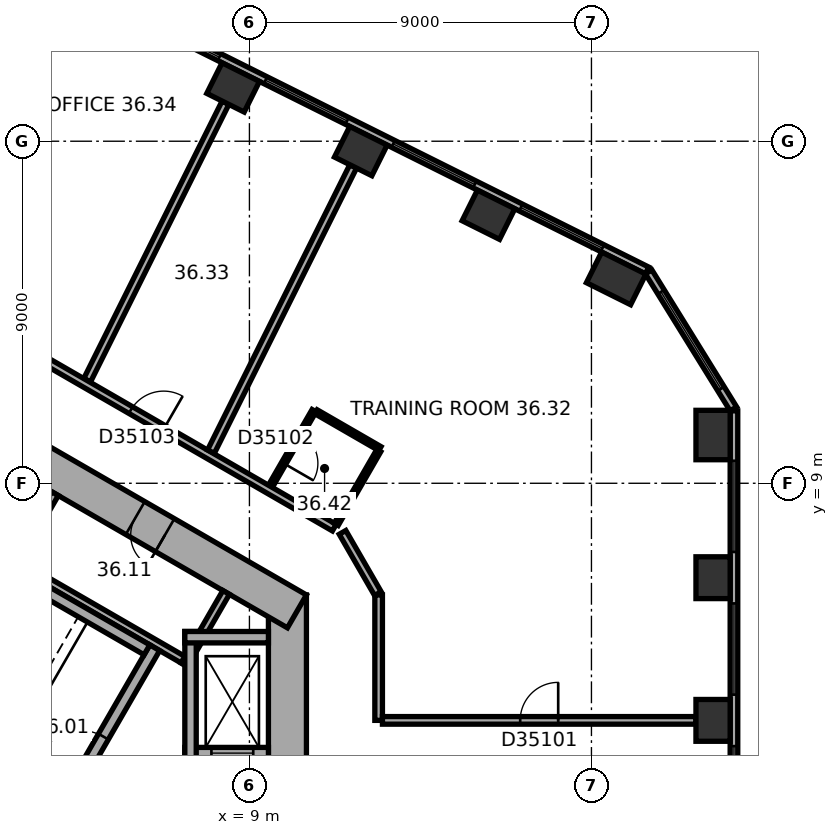
"""IFC4 building model, lengths in metres.
Left out: names, types, materials, properties, quantities, classifications, styles, units other than length and angle.
Written with IfcOpenShell. Run it as: python <this file> out.ifc"""

import sys

from ifc_helpers import new_model, si_unit, direction, frame, frame_2d, origin, origin_2d, place, context, subcontext, project, spatial, rectangle, extrude, element, fill, save


model = new_model("IFC4")
c1 = context("Model", 3, precision=1e-05, world=origin(), true_north=direction((0.0, 1.0)))
c2 = subcontext(c1, "Body", "Model", "MODEL_VIEW")
j1 = project(units=[si_unit("LENGTHUNIT", "METRE"), si_unit("PLANEANGLEUNIT", "RADIAN")], contexts=[c1])
p1 = place(None, origin())
s1 = spatial("IfcSite", under=j1, at=p1, CompositionType="ELEMENT")
p2 = place(p1, origin())
s2 = spatial("IfcBuilding", under=s1, at=p2, CompositionType="ELEMENT")
p3 = place(p2, frame((0.0, 0.0, 150.3)))
s3 = spatial("IfcBuildingStorey", under=s2, at=p3, CompositionType="ELEMENT", Elevation=150.3)
for number, where, z_axis, x_axis in (
    (1, (21.2, 2.761, 0.0), (0.0, 0.0, 1.0), (0.0, 1.0, 0.0)),
    (2, (21.2, 6.515, 0.0), (0.0, 0.0, 1.0), (0.0, 1.0, 0.0)),
):
    element("IfcColumn", number, at=place(p3, frame(where, z_axis=z_axis, x_axis=x_axis)), inside=s3, PredefinedType="COLUMN", context=c2, shape_type="SweptSolid", body=[
        extrude(rectangle(XDim=1.1, YDim=0.9, at=origin_2d()), origin(), (0.0, 0.0, 1.0), 3.7),
    ])
for number, where, z_axis, x_axis in (
    (3, (21.2, 10.27, 0.0), (0.0, 0.0, 1.0), (0.0, 1.0, 0.0)),
    (4, (18.65, 14.39, 0.0), (0.0, 0.0, 1.0), (-0.895, 0.446, 0.0)),
):
    element("IfcColumn", number, at=place(p3, frame(where, z_axis=z_axis, x_axis=x_axis)), inside=s3, PredefinedType="COLUMN", context=c2, shape_type="SweptSolid", body=[
        extrude(rectangle(XDim=1.3, YDim=0.9, at=origin_2d()), origin(), (0.0, 0.0, 1.0), 3.7),
    ])
for number, where, z_axis, x_axis in (
    (5, (15.29, 16.065, 0.0), (0.0, 0.0, 1.0), (-0.895, 0.446, 0.0)),
    (6, (11.931, 17.74, 0.0), (0.0, 0.0, 1.0), (-0.895, 0.446, 0.0)),
    (7, (8.571, 19.416, 0.0), (0.0, 0.0, 1.0), (-0.895, 0.446, 0.0)),
):
    element("IfcColumn", number, at=place(p3, frame(where, z_axis=z_axis, x_axis=x_axis)), inside=s3, PredefinedType="COLUMN", context=c2, shape_type="SweptSolid", body=[
        extrude(rectangle(XDim=1.1, YDim=0.9, at=origin_2d()), origin(), (0.0, 0.0, 1.0), 3.7),
    ])
p4 = place(p3, frame((10.0, -6.062, 0.0), z_axis=(0.0, 0.0, 1.0), x_axis=(0.0, 1.0, 0.0)))
e8 = element("IfcWall", 8, at=p4, inside=s3, PredefinedType="SHEAR", context=c2, shape_type="SweptSolid", body=[
    extrude(rectangle(XDim=12.125, YDim=1.0, at=frame_2d((6.062, 0.0))), origin(), (0.0, 0.0, 1.0), 3.7),
])
p5 = place(p4, frame((6.262, 0.0, 0.0)))
e9 = element("IfcOpeningElement", 9, at=p5, cuts=e8, PredefinedType="OPENING", context=c2, shape_type="SweptSolid", body=[
    extrude(rectangle(XDim=1.5, YDim=2.1, at=frame_2d((0.75, 1.05))), frame((0.0, 0.51, 0.0), z_axis=(0.0, -1.0, 0.0), x_axis=(1.0, 0.0, 0.0)), (0.0, 0.0, 1.0), 1.02),
])
p6 = place(p4, frame((3.112, 0.0, 0.0)))
e10 = element("IfcOpeningElement", 10, at=p6, cuts=e8, PredefinedType="OPENING", context=c2, shape_type="SweptSolid", body=[
    extrude(rectangle(XDim=0.9, YDim=2.1, at=frame_2d((0.45, 1.05))), frame((0.0, 0.51, 0.0), z_axis=(0.0, -1.0, 0.0), x_axis=(1.0, 0.0, 0.0)), (0.0, 0.0, 1.0), 1.02),
])
p7 = place(p3, frame((10.25, 5.629, 0.0), z_axis=(0.0, 0.0, 1.0), x_axis=(-0.866022616891, 0.50000482701, 0.0)))
e11 = element("IfcWall", 11, at=p7, inside=s3, PredefinedType="SHEAR", context=c2, shape_type="SweptSolid", body=[
    extrude(rectangle(XDim=12.125, YDim=1.0, at=frame_2d((6.062, 0.0))), origin(), (0.0, 0.0, 1.0), 3.7),
])
p8 = place(p7, frame((4.012, 0.0, 0.0)))
e12 = element("IfcOpeningElement", 12, at=p8, cuts=e11, PredefinedType="OPENING", context=c2, shape_type="SweptSolid", body=[
    extrude(rectangle(XDim=0.9, YDim=2.1, at=frame_2d((0.45, 1.05))), frame((0.0, 0.51, 0.0), z_axis=(0.0, -1.0, 0.0), x_axis=(1.0, 0.0, 0.0)), (0.0, 0.0, 1.0), 1.02),
])
p9 = place(p7, frame((7.912, 0.0, 0.0)))
e13 = element("IfcOpeningElement", 13, at=p9, cuts=e11, PredefinedType="OPENING", context=c2, shape_type="SweptSolid", body=[
    extrude(rectangle(XDim=0.9, YDim=2.1, at=frame_2d((0.45, 1.05))), frame((0.0, 0.51, 0.0), z_axis=(0.0, -1.0, 0.0), x_axis=(1.0, 0.0, 0.0)), (0.0, 0.0, 1.0), 1.02),
])
p10 = place(p3, frame((21.75, -9.138, 0.0), z_axis=(0.0, 0.0, 1.0), x_axis=(0.0, 1.0, 0.0)))
e14 = element("IfcWall", 14, at=p10, inside=s3, PredefinedType="STANDARD", context=c2, shape_type="SweptSolid", body=[
    extrude(rectangle(XDim=20.044, YDim=0.2, at=frame_2d((10.022, 0.0))), origin(), (0.0, 0.0, 1.0), 3.7),
])
p11 = place(p10, frame((1.314, 0.0, 0.9)))
e15 = element("IfcOpeningElement", 15, at=p11, cuts=e14, PredefinedType="OPENING", context=c2, shape_type="SweptSolid", body=[
    extrude(rectangle(XDim=2.4, YDim=2.0, at=frame_2d((1.2, 1.0))), frame((0.0, 0.11, 0.0), z_axis=(0.0, -1.0, 0.0), x_axis=(1.0, 0.0, 0.0)), (0.0, 0.0, 1.0), 0.22),
])
p12 = place(p10, frame((5.069, 0.0, 0.9)))
e16 = element("IfcOpeningElement", 16, at=p12, cuts=e14, PredefinedType="OPENING", context=c2, shape_type="SweptSolid", body=[
    extrude(rectangle(XDim=2.4, YDim=2.0, at=frame_2d((1.2, 1.0))), frame((0.0, 0.11, 0.0), z_axis=(0.0, -1.0, 0.0), x_axis=(1.0, 0.0, 0.0)), (0.0, 0.0, 1.0), 0.22),
])
p13 = place(p10, frame((8.823, 0.0, 0.9)))
e17 = element("IfcOpeningElement", 17, at=p13, cuts=e14, PredefinedType="OPENING", context=c2, shape_type="SweptSolid", body=[
    extrude(rectangle(XDim=2.4, YDim=2.0, at=frame_2d((1.2, 1.0))), frame((0.0, 0.11, 0.0), z_axis=(0.0, -1.0, 0.0), x_axis=(1.0, 0.0, 0.0)), (0.0, 0.0, 1.0), 0.22),
])
p14 = place(p10, frame((12.577, 0.0, 0.9)))
e18 = element("IfcOpeningElement", 18, at=p14, cuts=e14, PredefinedType="OPENING", context=c2, shape_type="SweptSolid", body=[
    extrude(rectangle(XDim=2.4, YDim=2.0, at=frame_2d((1.2, 1.0))), frame((0.0, 0.11, 0.0), z_axis=(0.0, -1.0, 0.0), x_axis=(1.0, 0.0, 0.0)), (0.0, 0.0, 1.0), 0.22),
])
p15 = place(p10, frame((16.331, 0.0, 0.9)))
e19 = element("IfcOpeningElement", 19, at=p15, cuts=e14, PredefinedType="OPENING", context=c2, shape_type="SweptSolid", body=[
    extrude(rectangle(XDim=2.4, YDim=2.0, at=frame_2d((1.2, 1.0))), frame((0.0, 0.11, 0.0), z_axis=(0.0, -1.0, 0.0), x_axis=(1.0, 0.0, 0.0)), (0.0, 0.0, 1.0), 0.22),
])
p16 = place(p3, frame((21.735, 10.958, 0.0), z_axis=(0.0, 0.0, 1.0), x_axis=(-0.526213807775, 0.850352296702, 0.0)))
e20 = element("IfcWall", 20, at=p16, inside=s3, PredefinedType="STANDARD", context=c2, shape_type="SweptSolid", body=[
    extrude(rectangle(XDim=4.238, YDim=0.2, at=frame_2d((2.119, 0.0))), origin(), (0.0, 0.0, 1.0), 3.7),
])
p17 = place(p16, frame((0.619, 0.0, 0.9)))
e21 = element("IfcOpeningElement", 21, at=p17, cuts=e20, PredefinedType="OPENING", context=c2, shape_type="SweptSolid", body=[
    extrude(rectangle(XDim=3.0, YDim=2.0, at=frame_2d((1.5, 1.0))), frame((0.0, 0.11, 0.0), z_axis=(0.0, -1.0, 0.0), x_axis=(1.0, 0.0, 0.0)), (0.0, 0.0, 1.0), 0.22),
])
p18 = place(p3, frame((19.464, 14.599, 0.0), z_axis=(0.0, 0.0, 1.0), x_axis=(-0.894935755043, 0.446195018289, 0.0)))
e22 = element("IfcWall", 22, at=p18, inside=s3, PredefinedType="STANDARD", context=c2, shape_type="SweptSolid", body=[
    extrude(rectangle(XDim=20.044, YDim=0.2, at=frame_2d((10.022, 0.0))), origin(), (0.0, 0.0, 1.0), 3.7),
])
p19 = place(p18, frame((1.313, 0.0, 0.9)))
e23 = element("IfcOpeningElement", 23, at=p19, cuts=e22, PredefinedType="OPENING", context=c2, shape_type="SweptSolid", body=[
    extrude(rectangle(XDim=2.4, YDim=2.0, at=frame_2d((1.2, 1.0))), frame((0.0, 0.11, 0.0), z_axis=(0.0, -1.0, 0.0), x_axis=(1.0, 0.0, 0.0)), (0.0, 0.0, 1.0), 0.22),
])
p20 = place(p18, frame((5.067, 0.0, 0.9)))
e24 = element("IfcOpeningElement", 24, at=p20, cuts=e22, PredefinedType="OPENING", context=c2, shape_type="SweptSolid", body=[
    extrude(rectangle(XDim=2.4, YDim=2.0, at=frame_2d((1.2, 1.0))), frame((0.0, 0.11, 0.0), z_axis=(0.0, -1.0, 0.0), x_axis=(1.0, 0.0, 0.0)), (0.0, 0.0, 1.0), 0.22),
])
p21 = place(p18, frame((8.821, 0.0, 0.9)))
e25 = element("IfcOpeningElement", 25, at=p21, cuts=e22, PredefinedType="OPENING", context=c2, shape_type="SweptSolid", body=[
    extrude(rectangle(XDim=2.4, YDim=2.0, at=frame_2d((1.2, 1.0))), frame((0.0, 0.11, 0.0), z_axis=(0.0, -1.0, 0.0), x_axis=(1.0, 0.0, 0.0)), (0.0, 0.0, 1.0), 0.22),
])
p22 = place(p18, frame((12.575, 0.0, 0.9)))
e26 = element("IfcOpeningElement", 26, at=p22, cuts=e22, PredefinedType="OPENING", context=c2, shape_type="SweptSolid", body=[
    extrude(rectangle(XDim=2.4, YDim=2.0, at=frame_2d((1.2, 1.0))), frame((0.0, 0.11, 0.0), z_axis=(0.0, -1.0, 0.0), x_axis=(1.0, 0.0, 0.0)), (0.0, 0.0, 1.0), 0.22),
])
p23 = place(p18, frame((16.329, 0.0, 0.9)))
e27 = element("IfcOpeningElement", 27, at=p23, cuts=e22, PredefinedType="OPENING", context=c2, shape_type="SweptSolid", body=[
    extrude(rectangle(XDim=2.4, YDim=2.0, at=frame_2d((1.2, 1.0))), frame((0.0, 0.11, 0.0), z_axis=(0.0, -1.0, 0.0), x_axis=(1.0, 0.0, 0.0)), (0.0, 0.0, 1.0), 0.22),
])
p24 = place(p3, frame((7.424, 4.259, 0.0), z_axis=(0.0, 0.0, 1.0), x_axis=(-0.866026010844, 0.49999894854, 0.0)))
e28 = element("IfcWall", 28, at=p24, inside=s3, PredefinedType="PARTITIONING", context=c2, shape_type="SweptSolid", body=[
    extrude(rectangle(XDim=8.0, YDim=0.2, at=frame_2d((4.0, 0.0))), origin(), (0.0, 0.0, 1.0), 3.42),
])
for number, where, z_axis, x_axis in (
    (29, (7.287, 4.222, 0.0), (0.0, 0.0, 1.0), (0.5, 0.866, 0.0)),
    (30, (2.784, 6.822, 0.0), (0.0, 0.0, 1.0), (0.5, 0.866, 0.0)),
):
    element("IfcWall", number, at=place(p3, frame(where, z_axis=z_axis, x_axis=x_axis)), inside=s3, PredefinedType="PARTITIONING", context=c2, shape_type="SweptSolid", body=[
        extrude(rectangle(XDim=2.2, YDim=0.2, at=frame_2d((1.1, 0.0))), origin(), (0.0, 0.0, 1.0), 3.42),
    ])
p25 = place(p3, frame((4.158, 0.602, 0.0), z_axis=(0.0, 0.0, 1.0), x_axis=(0.499977259774, 0.866038532462, 0.0)))
e31 = element("IfcWall", 31, at=p25, inside=s3, PredefinedType="SHEAR", context=c2, shape_type="SweptSolid", body=[
    extrude(rectangle(XDim=4.7, YDim=0.3, at=frame_2d((2.35, 0.0))), origin(), (0.0, 0.0, 1.0), 3.42),
])
p26 = place(p25, frame((0.8, 0.0, 0.0)))
e32 = element("IfcOpeningElement", 32, at=p26, cuts=e31, PredefinedType="OPENING", context=c2, shape_type="SweptSolid", body=[
    extrude(rectangle(XDim=1.2, YDim=2.1, at=frame_2d((0.6, 1.05))), frame((0.0, 0.16, 0.0), z_axis=(0.0, -1.0, 0.0), x_axis=(1.0, 0.0, 0.0)), (0.0, 0.0, 1.0), 0.32),
])
for number, where, z_axis, x_axis in (
    (33, (4.103, 0.807, 0.0), (0.0, 0.0, 1.0), (-0.866, 0.5, 0.0)),
    (34, (6.303, 4.617, 0.0), (0.0, 0.0, 1.0), (-0.866, 0.5, 0.0)),
):
    element("IfcWall", number, at=place(p3, frame(where, z_axis=z_axis, x_axis=x_axis)), inside=s3, PredefinedType="SHEAR", context=c2, shape_type="SweptSolid", body=[
        extrude(rectangle(XDim=7.06, YDim=0.3, at=frame_2d((3.53, 0.0))), origin(), (0.0, 0.0, 1.0), 3.42),
    ])
p27 = place(p3, frame((7.3, 1.9, 0.0), z_axis=(0.0, 0.0, 1.0), x_axis=(1.0, 0.0, 0.0)))
e35 = element("IfcWall", 35, at=p27, inside=s3, PredefinedType="SHEAR", context=c2, shape_type="SweptSolid", body=[
    extrude(rectangle(XDim=2.2, YDim=0.3, at=frame_2d((1.1, 0.0))), origin(), (0.0, 0.0, 1.0), 3.42),
])
p28 = place(p27, frame((0.7, 0.0, 0.0)))
e36 = element("IfcOpeningElement", 36, at=p28, cuts=e35, PredefinedType="OPENING", context=c2, shape_type="SweptSolid", body=[
    extrude(rectangle(XDim=1.1, YDim=2.1, at=frame_2d((0.55, 1.05))), frame((0.0, 0.16, 0.0), z_axis=(0.0, -1.0, 0.0), x_axis=(1.0, 0.0, 0.0)), (0.0, 0.0, 1.0), 0.32),
])
p29 = place(p3, frame((7.45, 1.75, 0.0), z_axis=(0.0, 0.0, 1.0), x_axis=(0.0, 1.0, 0.0)))
e37 = element("IfcWall", 37, at=p29, inside=s3, PredefinedType="SHEAR", context=c2, shape_type="SweptSolid", body=[
    extrude(rectangle(XDim=3.35, YDim=0.3, at=frame_2d((1.675, 0.0))), origin(), (0.0, 0.0, 1.0), 3.42),
])
p30 = place(p3, frame((7.3, 4.95, 0.0), z_axis=(0.0, 0.0, 1.0), x_axis=(1.0, 0.0, 0.0)))
e38 = element("IfcWall", 38, at=p30, inside=s3, PredefinedType="SHEAR", context=c2, shape_type="SweptSolid", body=[
    extrude(rectangle(XDim=2.2, YDim=0.3, at=frame_2d((1.1, 0.0))), origin(), (0.0, 0.0, 1.0), 3.42),
])
p31 = place(p3, frame((8.37, 19.013, 0.0), z_axis=(0.0, 0.0, 1.0), x_axis=(-0.446183598632, -0.894941448538, 0.0)))
e39 = element("IfcWall", 39, at=p31, inside=s3, PredefinedType="PARTITIONING", context=c2, shape_type="SweptSolid", body=[
    extrude(rectangle(XDim=8.156, YDim=0.2, at=frame_2d((4.078, 0.0))), origin(), (0.0, 0.0, 1.0), 3.42),
])
p32 = place(p3, frame((9.552, 8.919, 0.0), z_axis=(0.0, 0.0, 1.0), x_axis=(0.499952165731, 0.866053019151, 0.0)))
e40 = element("IfcWall", 40, at=p32, inside=s3, PredefinedType="PARTITIONING", context=c2, shape_type="SweptSolid", body=[
    extrude(rectangle(XDim=2.3, YDim=0.12, at=frame_2d((1.15, 0.0))), origin(), (0.0, 0.0, 1.0), 3.42),
])
p33 = place(p32, frame((0.7, 0.0, 0.0)))
e41 = element("IfcOpeningElement", 41, at=p33, cuts=e40, PredefinedType="OPENING", context=c2, shape_type="SweptSolid", body=[
    extrude(rectangle(XDim=0.9, YDim=2.1, at=frame_2d((0.45, 1.05))), frame((0.0, 0.07, 0.0), z_axis=(0.0, -1.0, 0.0), x_axis=(1.0, 0.0, 0.0)), (0.0, 0.0, 1.0), 0.14),
])
p34 = place(p3, frame((10.753, 10.881, 0.0), z_axis=(0.0, 0.0, 1.0), x_axis=(0.866043088465, -0.499969367985, 0.0)))
e42 = element("IfcWall", 42, at=p34, inside=s3, PredefinedType="PARTITIONING", context=c2, shape_type="SweptSolid", body=[
    extrude(rectangle(XDim=1.94, YDim=0.12, at=frame_2d((0.97, 0.0))), origin(), (0.0, 0.0, 1.0), 3.42),
])
p35 = place(p3, frame((11.233, 7.833, 0.0), z_axis=(0.0, 0.0, 1.0), x_axis=(-0.866021713988, 0.50000639086, 0.0)))
e43 = element("IfcWall", 43, at=p35, inside=s3, PredefinedType="PARTITIONING", context=c2, shape_type="SweptSolid", body=[
    extrude(rectangle(XDim=11.834, YDim=0.2, at=frame_2d((5.917, 0.0))), origin(), (0.0, 0.0, 1.0), 3.42),
])
p36 = place(p35, frame((5.185, 0.0, 0.0)))
e44 = element("IfcOpeningElement", 44, at=p36, cuts=e43, PredefinedType="OPENING", context=c2, shape_type="SweptSolid", body=[
    extrude(rectangle(XDim=1.0, YDim=2.1, at=frame_2d((0.5, 1.05))), frame((0.0, 0.11, 0.0), z_axis=(0.0, -1.0, 0.0), x_axis=(1.0, 0.0, 0.0)), (0.0, 0.0, 1.0), 0.22),
])
p37 = place(p3, frame((11.73, 17.338, 0.0), z_axis=(0.0, 0.0, 1.0), x_axis=(-0.446165200553, -0.894950620881, 0.0)))
e45 = element("IfcWall", 45, at=p37, inside=s3, PredefinedType="PARTITIONING", context=c2, shape_type="SweptSolid", body=[
    extrude(rectangle(XDim=8.386, YDim=0.2, at=frame_2d((4.193, 0.0))), origin(), (0.0, 0.0, 1.0), 2.87),
])
p38 = place(p3, frame((12.38, 6.097, 0.0), z_axis=(0.0, 0.0, 1.0), x_axis=(-0.499964847546, 0.866045698112, 0.0)))
e46 = element("IfcWall", 46, at=p38, inside=s3, PredefinedType="PARTITIONING", context=c2, shape_type="SweptSolid", body=[
    extrude(rectangle(XDim=1.86, YDim=0.2, at=frame_2d((0.93, 0.0))), origin(), (0.0, 0.0, 1.0), 3.42),
])
p39 = place(p3, frame((12.4, 2.761, 0.0), z_axis=(0.0, 0.0, 1.0), x_axis=(0.0, 1.0, 0.0)))
e47 = element("IfcWall", 47, at=p39, inside=s3, PredefinedType="PARTITIONING", context=c2, shape_type="SweptSolid", body=[
    extrude(rectangle(XDim=3.301, YDim=0.2, at=frame_2d((1.65, 0.0))), origin(), (0.0, 0.0, 1.0), 3.42),
])
p40 = place(p3, frame((12.404, 9.859, 0.0), z_axis=(0.0, 0.0, 1.0), x_axis=(-0.500030632641, -0.866007717299, 0.0)))
e48 = element("IfcWall", 48, at=p40, inside=s3, PredefinedType="PARTITIONING", context=c2, shape_type="SweptSolid", body=[
    extrude(rectangle(XDim=2.24, YDim=0.12, at=frame_2d((1.12, 0.0))), origin(), (0.0, 0.0, 1.0), 3.42),
])
p41 = place(p3, frame((20.75, 2.761, 0.0), z_axis=(0.0, 0.0, 1.0), x_axis=(-1.0, 0.0, 0.0)))
e49 = element("IfcWall", 49, at=p41, inside=s3, PredefinedType="PARTITIONING", context=c2, shape_type="SweptSolid", body=[
    extrude(rectangle(XDim=8.25, YDim=0.2, at=frame_2d((4.125, 0.0))), origin(), (0.0, 0.0, 1.0), 3.42),
])
p42 = place(p41, frame((3.625, 0.0, 0.0)))
e50 = element("IfcOpeningElement", 50, at=p42, cuts=e49, PredefinedType="OPENING", context=c2, shape_type="SweptSolid", body=[
    extrude(rectangle(XDim=1.0, YDim=2.1, at=frame_2d((0.5, 1.05))), frame((0.0, 0.11, 0.0), z_axis=(0.0, -1.0, 0.0), x_axis=(1.0, 0.0, 0.0)), (0.0, 0.0, 1.0), 0.22),
])
p43 = place(p13, origin())
e51 = element("IfcWindow", 51, at=p43, inside=s3, PartitioningType="SINGLE_PANEL", PredefinedType="WINDOW", context=c2, shape_type="SweptSolid", body=[
    extrude(rectangle(XDim=2.4, YDim=2.0, at=frame_2d((1.2, 1.0))), frame((0.0, 0.03, 0.0), z_axis=(0.0, -1.0, 0.0), x_axis=(1.0, 0.0, 0.0)), (0.0, 0.0, 1.0), 0.06),
])
fill(e17, e51)
p44 = place(p14, origin())
e52 = element("IfcWindow", 52, at=p44, inside=s3, PartitioningType="SINGLE_PANEL", PredefinedType="WINDOW", context=c2, shape_type="SweptSolid", body=[
    extrude(rectangle(XDim=2.4, YDim=2.0, at=frame_2d((1.2, 1.0))), frame((0.0, 0.03, 0.0), z_axis=(0.0, -1.0, 0.0), x_axis=(1.0, 0.0, 0.0)), (0.0, 0.0, 1.0), 0.06),
])
fill(e18, e52)
p45 = place(p15, origin())
e53 = element("IfcWindow", 53, at=p45, inside=s3, PartitioningType="SINGLE_PANEL", PredefinedType="WINDOW", context=c2, shape_type="SweptSolid", body=[
    extrude(rectangle(XDim=2.4, YDim=2.0, at=frame_2d((1.2, 1.0))), frame((0.0, 0.03, 0.0), z_axis=(0.0, -1.0, 0.0), x_axis=(1.0, 0.0, 0.0)), (0.0, 0.0, 1.0), 0.06),
])
fill(e19, e53)
p46 = place(p17, origin())
e54 = element("IfcWindow", 54, at=p46, inside=s3, PartitioningType="SINGLE_PANEL", PredefinedType="WINDOW", context=c2, shape_type="SweptSolid", body=[
    extrude(rectangle(XDim=3.0, YDim=2.0, at=frame_2d((1.5, 1.0))), frame((0.0, 0.03, 0.0), z_axis=(0.0, -1.0, 0.0), x_axis=(1.0, 0.0, 0.0)), (0.0, 0.0, 1.0), 0.06),
])
fill(e21, e54)
p47 = place(p19, origin())
e55 = element("IfcWindow", 55, at=p47, inside=s3, PartitioningType="SINGLE_PANEL", PredefinedType="WINDOW", context=c2, shape_type="SweptSolid", body=[
    extrude(rectangle(XDim=2.4, YDim=2.0, at=frame_2d((1.2, 1.0))), frame((0.0, 0.03, 0.0), z_axis=(0.0, -1.0, 0.0), x_axis=(1.0, 0.0, 0.0)), (0.0, 0.0, 1.0), 0.06),
])
fill(e23, e55)
p48 = place(p20, origin())
e56 = element("IfcWindow", 56, at=p48, inside=s3, PartitioningType="SINGLE_PANEL", PredefinedType="WINDOW", context=c2, shape_type="SweptSolid", body=[
    extrude(rectangle(XDim=2.4, YDim=2.0, at=frame_2d((1.2, 1.0))), frame((0.0, 0.03, 0.0), z_axis=(0.0, -1.0, 0.0), x_axis=(1.0, 0.0, 0.0)), (0.0, 0.0, 1.0), 0.06),
])
fill(e24, e56)
p49 = place(p21, origin())
e57 = element("IfcWindow", 57, at=p49, inside=s3, PartitioningType="SINGLE_PANEL", PredefinedType="WINDOW", context=c2, shape_type="SweptSolid", body=[
    extrude(rectangle(XDim=2.4, YDim=2.0, at=frame_2d((1.2, 1.0))), frame((0.0, 0.03, 0.0), z_axis=(0.0, -1.0, 0.0), x_axis=(1.0, 0.0, 0.0)), (0.0, 0.0, 1.0), 0.06),
])
fill(e25, e57)
p50 = place(p22, origin())
e58 = element("IfcWindow", 58, at=p50, inside=s3, PartitioningType="SINGLE_PANEL", PredefinedType="WINDOW", context=c2, shape_type="SweptSolid", body=[
    extrude(rectangle(XDim=2.4, YDim=2.0, at=frame_2d((1.2, 1.0))), frame((0.0, 0.03, 0.0), z_axis=(0.0, -1.0, 0.0), x_axis=(1.0, 0.0, 0.0)), (0.0, 0.0, 1.0), 0.06),
])
fill(e26, e58)
p51 = place(p26, origin())
e59 = element("IfcDoor", 59, at=p51, inside=s3, OperationType="SINGLE_SWING_RIGHT", PredefinedType="DOOR", context=c2, shape_type="SweptSolid", body=[
    extrude(rectangle(XDim=1.2, YDim=2.1, at=frame_2d((0.6, 1.05))), frame((0.0, 0.025, 0.0), z_axis=(0.0, -1.0, 0.0), x_axis=(1.0, 0.0, 0.0)), (0.0, 0.0, 1.0), 0.05),
])
fill(e32, e59)
p52 = place(p8, origin())
e60 = element("IfcDoor", 60, at=p52, inside=s3, OperationType="SINGLE_SWING_LEFT", PredefinedType="DOOR", context=c2, shape_type="SweptSolid", body=[
    extrude(rectangle(XDim=0.9, YDim=2.1, at=frame_2d((0.45, 1.05))), frame((0.0, 0.025, 0.0), z_axis=(0.0, -1.0, 0.0), x_axis=(1.0, 0.0, 0.0)), (0.0, 0.0, 1.0), 0.05),
])
fill(e12, e60)
p53 = place(p28, origin())
e61 = element("IfcDoor", 61, at=p53, inside=s3, OperationType="DOUBLE_DOOR_SLIDING", PredefinedType="DOOR", context=c2, shape_type="SweptSolid", body=[
    extrude(rectangle(XDim=1.1, YDim=2.1, at=frame_2d((0.55, 1.05))), frame((0.0, 0.025, 0.0), z_axis=(0.0, -1.0, 0.0), x_axis=(1.0, 0.0, 0.0)), (0.0, 0.0, 1.0), 0.05),
])
fill(e36, e61)
p54 = place(p42, origin())
e62 = element("IfcDoor", 62, at=p54, inside=s3, OperationType="SINGLE_SWING_LEFT", PredefinedType="DOOR", context=c2, shape_type="SweptSolid", body=[
    extrude(rectangle(XDim=1.0, YDim=2.1, at=frame_2d((0.5, 1.05))), frame((0.0, 0.025, 0.0), z_axis=(0.0, -1.0, 0.0), x_axis=(1.0, 0.0, 0.0)), (0.0, 0.0, 1.0), 0.05),
])
fill(e50, e62)
p55 = place(p33, origin())
e63 = element("IfcDoor", 63, at=p55, inside=s3, OperationType="SINGLE_SWING_LEFT", PredefinedType="DOOR", context=c2, shape_type="SweptSolid", body=[
    extrude(rectangle(XDim=0.9, YDim=2.1, at=frame_2d((0.45, 1.05))), frame((0.0, 0.025, 0.0), z_axis=(0.0, -1.0, 0.0), x_axis=(1.0, 0.0, 0.0)), (0.0, 0.0, 1.0), 0.05),
])
fill(e41, e63)
p56 = place(p36, origin())
e64 = element("IfcDoor", 64, at=p56, inside=s3, OperationType="SINGLE_SWING_LEFT", PredefinedType="DOOR", context=c2, shape_type="SweptSolid", body=[
    extrude(rectangle(XDim=1.0, YDim=2.1, at=frame_2d((0.5, 1.05))), frame((0.0, 0.025, 0.0), z_axis=(0.0, -1.0, 0.0), x_axis=(1.0, 0.0, 0.0)), (0.0, 0.0, 1.0), 0.05),
])
fill(e44, e64)
save(model, sys.argv[1])
